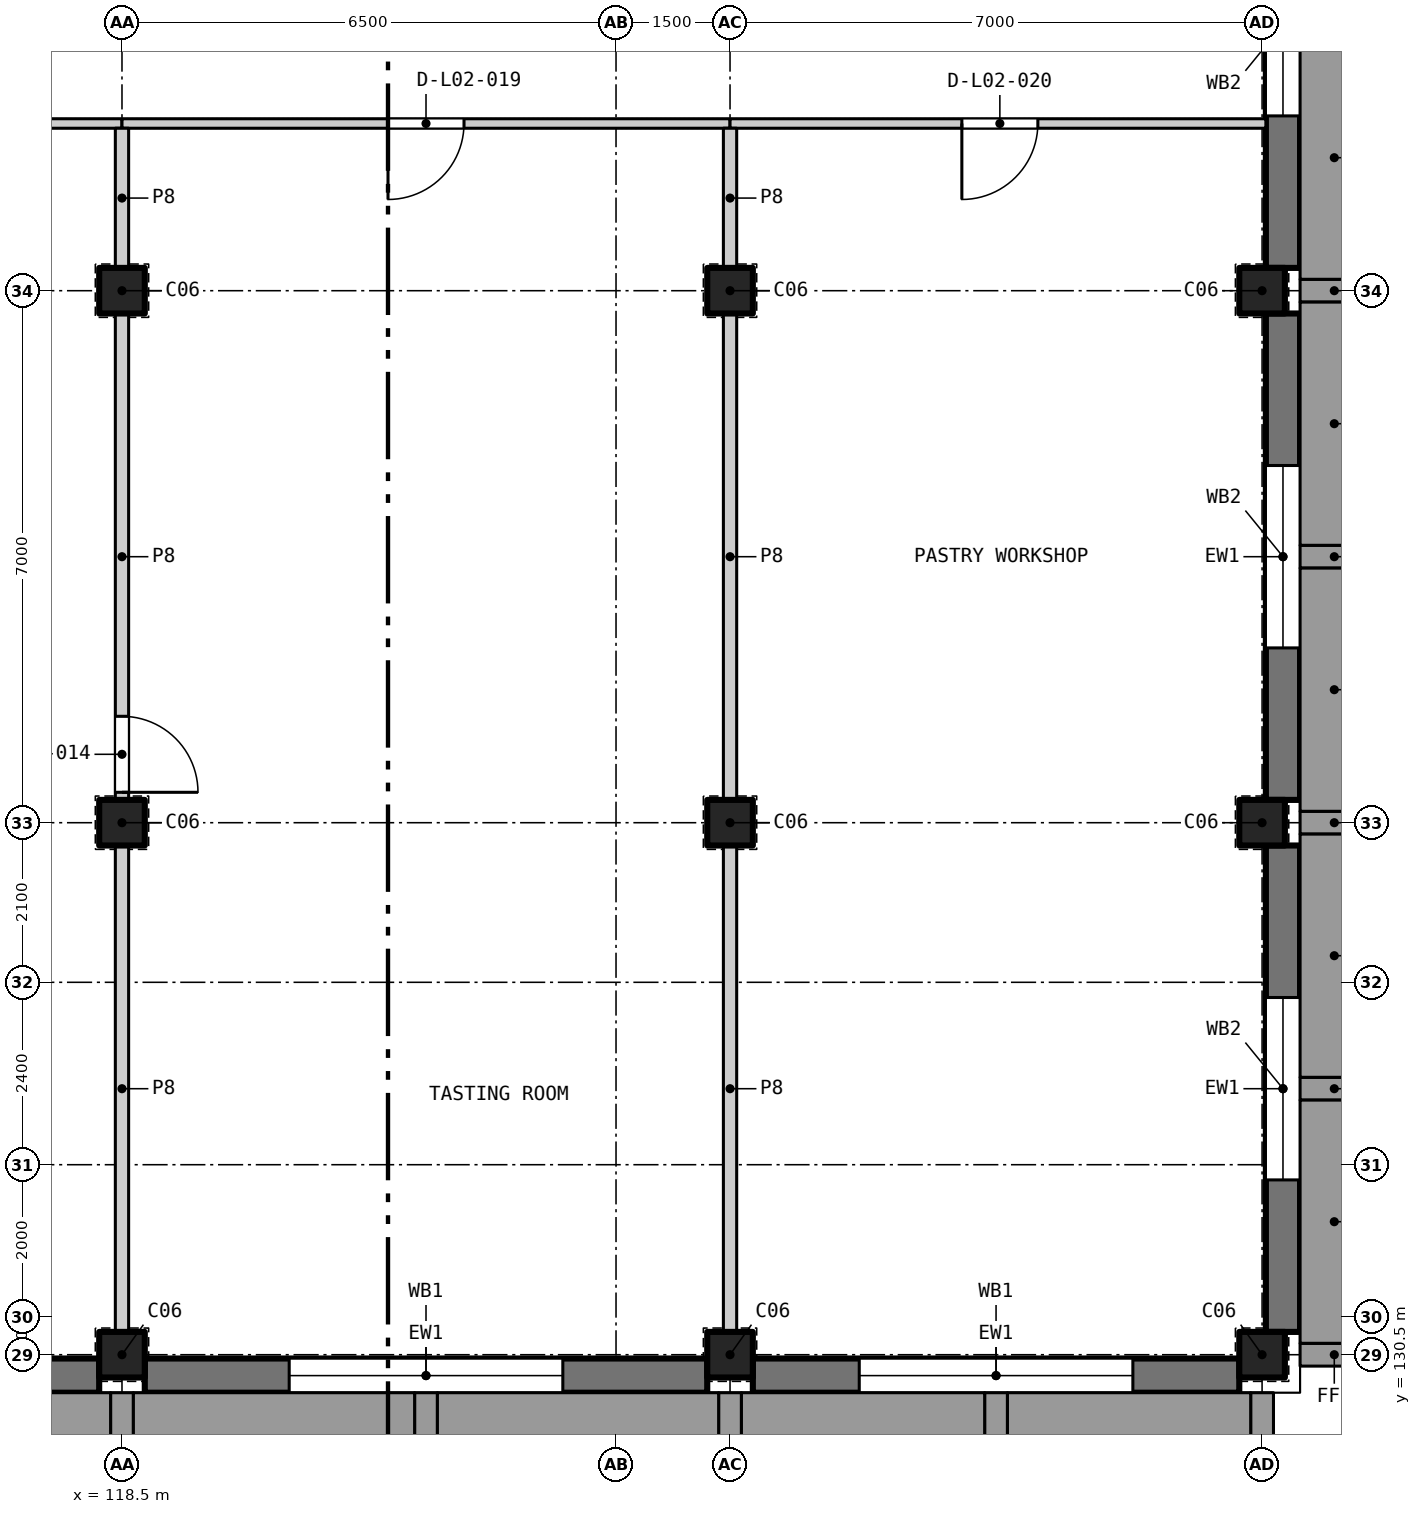
"""IFC4 building model, lengths in metres.
Left out: names, types, materials, properties, quantities, classifications, styles, units other than length and angle.
Written with IfcOpenShell. Run it as: python <this file> out.ifc"""

import sys

from ifc_helpers import new_model, si_unit, direction, frame, frame_2d, origin, origin_2d, place, context, subcontext, project, spatial, rectangle, extrude, element, fill, save


model = new_model("IFC4")
c1 = context("Model", 3, precision=1e-05, world=origin(), true_north=direction((0.0, 1.0)))
c2 = subcontext(c1, "Body", "Model", "MODEL_VIEW")
j1 = project(units=[si_unit("LENGTHUNIT", "METRE"), si_unit("PLANEANGLEUNIT", "RADIAN")], contexts=[c1])
p1 = place(None, origin())
s1 = spatial("IfcSite", under=j1, at=p1, CompositionType="ELEMENT")
p2 = place(p1, origin())
s2 = spatial("IfcBuilding", under=s1, at=p2, CompositionType="ELEMENT")
p3 = place(p2, frame((0.0, 0.0, 10.2)))
s3 = spatial("IfcBuildingStorey", under=s2, at=p3, CompositionType="ELEMENT", Elevation=10.2)
for number, where, z_axis, x_axis in (
    (1, (118.5, 130.5, 0.0), (0.0, 0.0, 1.0), (1.0, 0.0, 0.0)),
    (2, (118.5, 137.5, 0.0), (0.0, 0.0, 1.0), (1.0, 0.0, 0.0)),
    (3, (118.5, 144.5, 0.0), (0.0, 0.0, 1.0), (1.0, 0.0, 0.0)),
    (4, (126.5, 130.5, 0.0), (0.0, 0.0, 1.0), (1.0, 0.0, 0.0)),
    (5, (126.5, 137.5, 0.0), (0.0, 0.0, 1.0), (1.0, 0.0, 0.0)),
    (6, (126.5, 144.5, 0.0), (0.0, 0.0, 1.0), (1.0, 0.0, 0.0)),
    (7, (133.5, 130.5, 0.0), (0.0, 0.0, 1.0), (1.0, 0.0, 0.0)),
    (8, (133.5, 137.5, 0.0), (0.0, 0.0, 1.0), (1.0, 0.0, 0.0)),
    (9, (133.5, 144.5, 0.0), (0.0, 0.0, 1.0), (1.0, 0.0, 0.0)),
):
    element("IfcColumn", number, at=place(p3, frame(where, z_axis=z_axis, x_axis=x_axis)), inside=s3, PredefinedType="COLUMN", context=c2, shape_type="SweptSolid", body=[
        extrude(rectangle(XDim=0.6, YDim=0.6, at=origin_2d()), origin(), (0.0, 0.0, 1.0), 4.2),
    ])
p4 = place(p3, frame((118.2, 130.225, 0.0), z_axis=(0.0, 0.0, 1.0), x_axis=(-1.0, 0.0, 0.0)))
e10 = element("IfcWall", 10, at=p4, inside=s3, PredefinedType="SOLIDWALL", context=c2, shape_type="SweptSolid", body=[
    extrude(rectangle(XDim=7.4, YDim=0.45, at=frame_2d((3.7, 0.0))), origin(), (0.0, 0.0, 1.0), 3.1),
])
p5 = place(p4, frame((1.9, 0.0, 0.9)))
e11 = element("IfcOpeningElement", 11, at=p5, cuts=e10, PredefinedType="OPENING", context=c2, shape_type="SweptSolid", body=[
    extrude(rectangle(XDim=3.6, YDim=1.6, at=frame_2d((1.8, 0.8))), frame((0.0, 0.235, 0.0), z_axis=(0.0, -1.0, 0.0), x_axis=(1.0, 0.0, 0.0)), (0.0, 0.0, 1.0), 0.47),
])
p6 = place(p3, frame((126.2, 130.225, 0.0), z_axis=(0.0, 0.0, 1.0), x_axis=(-1.0, 0.0, 0.0)))
e12 = element("IfcWall", 12, at=p6, inside=s3, PredefinedType="SOLIDWALL", context=c2, shape_type="SweptSolid", body=[
    extrude(rectangle(XDim=7.4, YDim=0.45, at=frame_2d((3.7, 0.0))), origin(), (0.0, 0.0, 1.0), 3.1),
])
p7 = place(p6, frame((1.9, 0.0, 0.9)))
e13 = element("IfcOpeningElement", 13, at=p7, cuts=e12, PredefinedType="OPENING", context=c2, shape_type="SweptSolid", body=[
    extrude(rectangle(XDim=3.6, YDim=1.6, at=frame_2d((1.8, 0.8))), frame((0.0, 0.235, 0.0), z_axis=(0.0, -1.0, 0.0), x_axis=(1.0, 0.0, 0.0)), (0.0, 0.0, 1.0), 0.47),
])
p8 = place(p3, frame((133.2, 130.225, 0.0), z_axis=(0.0, 0.0, 1.0), x_axis=(-1.0, 0.0, 0.0)))
e14 = element("IfcWall", 14, at=p8, inside=s3, PredefinedType="SOLIDWALL", context=c2, shape_type="SweptSolid", body=[
    extrude(rectangle(XDim=6.4, YDim=0.45, at=frame_2d((3.2, 0.0))), origin(), (0.0, 0.0, 1.0), 3.1),
])
p9 = place(p8, frame((1.4, 0.0, 0.9)))
e15 = element("IfcOpeningElement", 15, at=p9, cuts=e14, PredefinedType="OPENING", context=c2, shape_type="SweptSolid", body=[
    extrude(rectangle(XDim=3.6, YDim=1.6, at=frame_2d((1.8, 0.8))), frame((0.0, 0.235, 0.0), z_axis=(0.0, -1.0, 0.0), x_axis=(1.0, 0.0, 0.0)), (0.0, 0.0, 1.0), 0.47),
])
p10 = place(p3, frame((133.775, 137.2, 0.0), z_axis=(0.0, 0.0, 1.0), x_axis=(0.0, -1.0, 0.0)))
e16 = element("IfcWall", 16, at=p10, inside=s3, PredefinedType="SOLIDWALL", context=c2, shape_type="SweptSolid", body=[
    extrude(rectangle(XDim=6.4, YDim=0.45, at=frame_2d((3.2, 0.0))), origin(), (0.0, 0.0, 1.0), 3.2),
])
p11 = place(p10, frame((2.0, 0.0, 0.9)))
e17 = element("IfcOpeningElement", 17, at=p11, cuts=e16, PredefinedType="OPENING", context=c2, shape_type="SweptSolid", body=[
    extrude(rectangle(XDim=2.4, YDim=1.6, at=frame_2d((1.2, 0.8))), frame((0.0, 0.235, 0.0), z_axis=(0.0, -1.0, 0.0), x_axis=(1.0, 0.0, 0.0)), (0.0, 0.0, 1.0), 0.47),
])
p12 = place(p3, frame((133.775, 144.2, 0.0), z_axis=(0.0, 0.0, 1.0), x_axis=(0.0, -1.0, 0.0)))
e18 = element("IfcWall", 18, at=p12, inside=s3, PredefinedType="SOLIDWALL", context=c2, shape_type="SweptSolid", body=[
    extrude(rectangle(XDim=6.4, YDim=0.45, at=frame_2d((3.2, 0.0))), origin(), (0.0, 0.0, 1.0), 3.2),
])
p13 = place(p12, frame((2.0, 0.0, 0.9)))
e19 = element("IfcOpeningElement", 19, at=p13, cuts=e18, PredefinedType="OPENING", context=c2, shape_type="SweptSolid", body=[
    extrude(rectangle(XDim=2.4, YDim=1.6, at=frame_2d((1.2, 0.8))), frame((0.0, 0.235, 0.0), z_axis=(0.0, -1.0, 0.0), x_axis=(1.0, 0.0, 0.0)), (0.0, 0.0, 1.0), 0.47),
])
p14 = place(p3, frame((133.775, 151.2, 0.0), z_axis=(0.0, 0.0, 1.0), x_axis=(0.0, -1.0, 0.0)))
e20 = element("IfcWall", 20, at=p14, inside=s3, PredefinedType="SOLIDWALL", context=c2, shape_type="SweptSolid", body=[
    extrude(rectangle(XDim=6.4, YDim=0.45, at=frame_2d((3.2, 0.0))), origin(), (0.0, 0.0, 1.0), 3.2),
])
p15 = place(p14, frame((2.0, 0.0, 0.9)))
e21 = element("IfcOpeningElement", 21, at=p15, cuts=e20, PredefinedType="OPENING", context=c2, shape_type="SweptSolid", body=[
    extrude(rectangle(XDim=2.4, YDim=1.6, at=frame_2d((1.2, 0.8))), frame((0.0, 0.235, 0.0), z_axis=(0.0, -1.0, 0.0), x_axis=(1.0, 0.0, 0.0)), (0.0, 0.0, 1.0), 0.47),
])
p16 = place(p3, frame((102.5, 146.7, 0.0), z_axis=(0.0, 0.0, 1.0), x_axis=(1.0, 0.0, 0.0)))
e22 = element("IfcWall", 22, at=p16, inside=s3, PredefinedType="PARTITIONING", context=c2, shape_type="SweptSolid", body=[
    extrude(rectangle(XDim=16.0, YDim=0.125, at=frame_2d((8.0, 0.0))), origin(), (0.0, 0.0, 1.0), 3.9),
])
p17 = place(p16, frame((1.5, 0.0, 0.0)))
e23 = element("IfcOpeningElement", 23, at=p17, cuts=e22, PredefinedType="OPENING", context=c2, shape_type="SweptSolid", body=[
    extrude(rectangle(XDim=1.8, YDim=2.1, at=frame_2d((0.9, 1.05))), frame((0.0, 0.073, 0.0), z_axis=(0.0, -1.0, 0.0), x_axis=(1.0, 0.0, 0.0)), (0.0, 0.0, 1.0), 0.145),
])
p18 = place(p16, frame((12.7, 0.0, 0.0)))
e24 = element("IfcOpeningElement", 24, at=p18, cuts=e22, PredefinedType="OPENING", context=c2, shape_type="SweptSolid", body=[
    extrude(rectangle(XDim=1.8, YDim=2.1, at=frame_2d((0.9, 1.05))), frame((0.0, 0.073, 0.0), z_axis=(0.0, -1.0, 0.0), x_axis=(1.0, 0.0, 0.0)), (0.0, 0.0, 1.0), 0.145),
])
p19 = place(p3, frame((118.5, 146.7, 0.0), z_axis=(0.0, 0.0, 1.0), x_axis=(1.0, 0.0, 0.0)))
e25 = element("IfcWall", 25, at=p19, inside=s3, PredefinedType="PARTITIONING", context=c2, shape_type="SweptSolid", body=[
    extrude(rectangle(XDim=8.0, YDim=0.125, at=frame_2d((4.0, 0.0))), origin(), (0.0, 0.0, 1.0), 3.9),
])
p20 = place(p19, frame((3.5, 0.0, 0.0)))
e26 = element("IfcOpeningElement", 26, at=p20, cuts=e25, PredefinedType="OPENING", context=c2, shape_type="SweptSolid", body=[
    extrude(rectangle(XDim=1.0, YDim=2.1, at=frame_2d((0.5, 1.05))), frame((0.0, 0.073, 0.0), z_axis=(0.0, -1.0, 0.0), x_axis=(1.0, 0.0, 0.0)), (0.0, 0.0, 1.0), 0.145),
])
p21 = place(p3, frame((126.5, 146.7, 0.0), z_axis=(0.0, 0.0, 1.0), x_axis=(1.0, 0.0, 0.0)))
e27 = element("IfcWall", 27, at=p21, inside=s3, PredefinedType="PARTITIONING", context=c2, shape_type="SweptSolid", body=[
    extrude(rectangle(XDim=7.05, YDim=0.125, at=frame_2d((3.525, 0.0))), origin(), (0.0, 0.0, 1.0), 3.9),
])
p22 = place(p21, frame((3.05, 0.0, 0.0)))
e28 = element("IfcOpeningElement", 28, at=p22, cuts=e27, PredefinedType="OPENING", context=c2, shape_type="SweptSolid", body=[
    extrude(rectangle(XDim=1.0, YDim=2.1, at=frame_2d((0.5, 1.05))), frame((0.0, 0.073, 0.0), z_axis=(0.0, -1.0, 0.0), x_axis=(1.0, 0.0, 0.0)), (0.0, 0.0, 1.0), 0.145),
])
p23 = place(p3, frame((118.5, 130.8, 0.0), z_axis=(0.0, 0.0, 1.0), x_axis=(0.0, 1.0, 0.0)))
e29 = element("IfcWall", 29, at=p23, inside=s3, PredefinedType="PARTITIONING", context=c2, shape_type="SweptSolid", body=[
    extrude(rectangle(XDim=6.4, YDim=0.175, at=frame_2d((3.2, 0.0))), origin(), (0.0, 0.0, 1.0), 3.2),
])
p24 = place(p3, frame((118.5, 137.8, 0.0), z_axis=(0.0, 0.0, 1.0), x_axis=(0.0, 1.0, 0.0)))
e30 = element("IfcWall", 30, at=p24, inside=s3, PredefinedType="PARTITIONING", context=c2, shape_type="SweptSolid", body=[
    extrude(rectangle(XDim=6.4, YDim=0.175, at=frame_2d((3.2, 0.0))), origin(), (0.0, 0.0, 1.0), 3.2),
])
p25 = place(p24, frame((0.1, 0.0, 0.0)))
e31 = element("IfcOpeningElement", 31, at=p25, cuts=e30, PredefinedType="OPENING", context=c2, shape_type="SweptSolid", body=[
    extrude(rectangle(XDim=1.0, YDim=2.1, at=frame_2d((0.5, 1.05))), frame((0.0, 0.097, 0.0), z_axis=(0.0, -1.0, 0.0), x_axis=(1.0, 0.0, 0.0)), (0.0, 0.0, 1.0), 0.195),
])
p26 = place(p3, frame((118.5, 144.8, 0.0), z_axis=(0.0, 0.0, 1.0), x_axis=(0.0, 1.0, 0.0)))
e32 = element("IfcWall", 32, at=p26, inside=s3, PredefinedType="PARTITIONING", context=c2, shape_type="SweptSolid", body=[
    extrude(rectangle(XDim=1.837, YDim=0.175, at=frame_2d((0.919, 0.0))), origin(), (0.0, 0.0, 1.0), 3.2),
])
for number, where, z_axis, x_axis in (
    (33, (126.5, 130.8, 0.0), (0.0, 0.0, 1.0), (0.0, 1.0, 0.0)),
    (34, (126.5, 137.8, 0.0), (0.0, 0.0, 1.0), (0.0, 1.0, 0.0)),
):
    element("IfcWall", number, at=place(p3, frame(where, z_axis=z_axis, x_axis=x_axis)), inside=s3, PredefinedType="PARTITIONING", context=c2, shape_type="SweptSolid", body=[
        extrude(rectangle(XDim=6.4, YDim=0.175, at=frame_2d((3.2, 0.0))), origin(), (0.0, 0.0, 1.0), 3.2),
    ])
p27 = place(p3, frame((126.5, 144.8, 0.0), z_axis=(0.0, 0.0, 1.0), x_axis=(0.0, 1.0, 0.0)))
e35 = element("IfcWall", 35, at=p27, inside=s3, PredefinedType="PARTITIONING", context=c2, shape_type="SweptSolid", body=[
    extrude(rectangle(XDim=1.837, YDim=0.175, at=frame_2d((0.919, 0.0))), origin(), (0.0, 0.0, 1.0), 3.2),
])
p28 = place(p7, origin())
e36 = element("IfcWindow", 36, at=p28, inside=s3, PartitioningType="SINGLE_PANEL", PredefinedType="WINDOW", context=c2, shape_type="SweptSolid", body=[
    extrude(rectangle(XDim=3.6, YDim=1.6, at=frame_2d((1.8, 0.8))), frame((0.0, -0.125, 0.0), z_axis=(0.0, -1.0, 0.0), x_axis=(1.0, 0.0, 0.0)), (0.0, 0.0, 1.0), 0.06),
])
fill(e13, e36)
p29 = place(p9, origin())
e37 = element("IfcWindow", 37, at=p29, inside=s3, PartitioningType="SINGLE_PANEL", PredefinedType="WINDOW", context=c2, shape_type="SweptSolid", body=[
    extrude(rectangle(XDim=3.6, YDim=1.6, at=frame_2d((1.8, 0.8))), frame((0.0, -0.125, 0.0), z_axis=(0.0, -1.0, 0.0), x_axis=(1.0, 0.0, 0.0)), (0.0, 0.0, 1.0), 0.06),
])
fill(e15, e37)
p30 = place(p11, origin())
e38 = element("IfcWindow", 38, at=p30, inside=s3, PartitioningType="SINGLE_PANEL", PredefinedType="WINDOW", context=c2, shape_type="SweptSolid", body=[
    extrude(rectangle(XDim=2.4, YDim=1.6, at=frame_2d((1.2, 0.8))), frame((0.0, -0.125, 0.0), z_axis=(0.0, -1.0, 0.0), x_axis=(1.0, 0.0, 0.0)), (0.0, 0.0, 1.0), 0.06),
])
fill(e17, e38)
p31 = place(p13, origin())
e39 = element("IfcWindow", 39, at=p31, inside=s3, PartitioningType="SINGLE_PANEL", PredefinedType="WINDOW", context=c2, shape_type="SweptSolid", body=[
    extrude(rectangle(XDim=2.4, YDim=1.6, at=frame_2d((1.2, 0.8))), frame((0.0, -0.125, 0.0), z_axis=(0.0, -1.0, 0.0), x_axis=(1.0, 0.0, 0.0)), (0.0, 0.0, 1.0), 0.06),
])
fill(e19, e39)
p32 = place(p15, origin())
e40 = element("IfcWindow", 40, at=p32, inside=s3, PartitioningType="SINGLE_PANEL", PredefinedType="WINDOW", context=c2, shape_type="SweptSolid", body=[
    extrude(rectangle(XDim=2.4, YDim=1.6, at=frame_2d((1.2, 0.8))), frame((0.0, -0.125, 0.0), z_axis=(0.0, -1.0, 0.0), x_axis=(1.0, 0.0, 0.0)), (0.0, 0.0, 1.0), 0.06),
])
fill(e21, e40)
p33 = place(p25, frame((1.0, 0.0, 0.0), z_axis=(0.0, 0.0, 1.0), x_axis=(-1.0, 0.0, 0.0)))
e41 = element("IfcDoor", 41, at=p33, inside=s3, OperationType="SINGLE_SWING_RIGHT", PredefinedType="DOOR", context=c2, shape_type="SweptSolid", body=[
    extrude(rectangle(XDim=1.0, YDim=2.1, at=frame_2d((0.5, 1.05))), frame((0.0, 0.025, 0.0), z_axis=(0.0, -1.0, 0.0), x_axis=(1.0, 0.0, 0.0)), (0.0, 0.0, 1.0), 0.05),
])
fill(e31, e41)
p34 = place(p20, frame((1.0, 0.0, 0.0), z_axis=(0.0, 0.0, 1.0), x_axis=(-1.0, 0.0, 0.0)))
e42 = element("IfcDoor", 42, at=p34, inside=s3, OperationType="SINGLE_SWING_RIGHT", PredefinedType="DOOR", context=c2, shape_type="SweptSolid", body=[
    extrude(rectangle(XDim=1.0, YDim=2.1, at=frame_2d((0.5, 1.05))), frame((0.0, 0.025, 0.0), z_axis=(0.0, -1.0, 0.0), x_axis=(1.0, 0.0, 0.0)), (0.0, 0.0, 1.0), 0.05),
])
fill(e26, e42)
p35 = place(p22, frame((1.0, 0.0, 0.0), z_axis=(0.0, 0.0, 1.0), x_axis=(-1.0, 0.0, 0.0)))
e43 = element("IfcDoor", 43, at=p35, inside=s3, OperationType="SINGLE_SWING_RIGHT", PredefinedType="DOOR", context=c2, shape_type="SweptSolid", body=[
    extrude(rectangle(XDim=1.0, YDim=2.1, at=frame_2d((0.5, 1.05))), frame((0.0, 0.025, 0.0), z_axis=(0.0, -1.0, 0.0), x_axis=(1.0, 0.0, 0.0)), (0.0, 0.0, 1.0), 0.05),
])
fill(e28, e43)
save(model, sys.argv[1])
